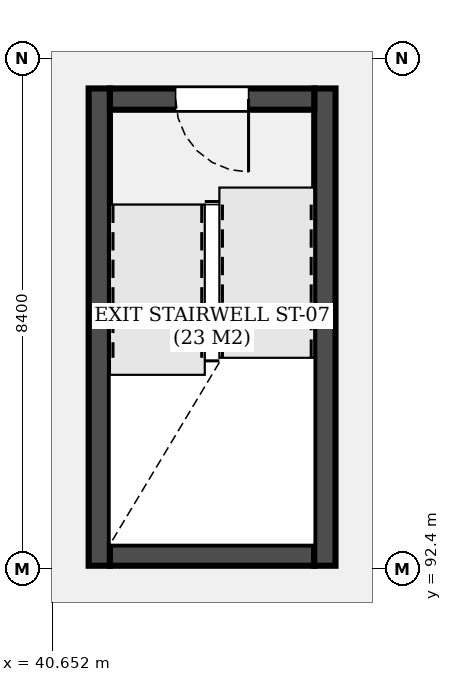
"""IFC4 building model, lengths in metres.
Left out: names, types, materials, properties, quantities, classifications, styles, units other than length and angle.
Written with IfcOpenShell. Run it as: python <this file> out.ifc"""

import sys

from ifc_helpers import new_model, si_unit, direction, frame, frame_2d, origin, place, context, subcontext, project, spatial, rectangle, extrude, element, fill, save


model = new_model("IFC4")
c1 = context("Model", 3, precision=1e-05, world=origin(), true_north=direction((0.0, 1.0)))
c2 = subcontext(c1, "Body", "Model", "MODEL_VIEW")
j1 = project(units=[si_unit("LENGTHUNIT", "METRE"), si_unit("PLANEANGLEUNIT", "RADIAN")], contexts=[c1])
p1 = place(None, origin())
s1 = spatial("IfcSite", under=j1, at=p1, CompositionType="ELEMENT")
p2 = place(p1, origin())
s2 = spatial("IfcBuilding", under=s1, at=p2, CompositionType="ELEMENT")
p3 = place(p2, frame((0.0, 0.0, 9.9)))
s3 = spatial("IfcBuildingStorey", under=s2, at=p3, CompositionType="ELEMENT", Elevation=9.9)
p4 = place(p3, frame((41.425, 100.3, 0.0), z_axis=(0.0, 0.0, 1.0), x_axis=(0.0, -1.0, 0.0)))
e1 = element("IfcWall", 1, at=p4, inside=s3, PredefinedType="SHEAR", context=c2, shape_type="SweptSolid", body=[
    extrude(rectangle(XDim=7.85, YDim=0.35, at=frame_2d((3.925, 0.0))), origin(), (0.0, 0.0, 1.0), 3.6),
])
p5 = place(p3, frame((41.6, 92.625, 0.0), z_axis=(0.0, 0.0, 1.0), x_axis=(1.0, 0.0, 0.0)))
e2 = element("IfcWall", 2, at=p5, inside=s3, PredefinedType="SHEAR", context=c2, shape_type="SweptSolid", body=[
    extrude(rectangle(XDim=3.36, YDim=0.35, at=frame_2d((1.68, 0.0))), origin(), (0.0, 0.0, 1.0), 3.6),
])
p6 = place(p3, frame((45.135, 92.45, 0.0), z_axis=(0.0, 0.0, 1.0), x_axis=(0.0, 1.0, 0.0)))
e3 = element("IfcWall", 3, at=p6, inside=s3, PredefinedType="SHEAR", context=c2, shape_type="SweptSolid", body=[
    extrude(rectangle(XDim=7.85, YDim=0.35, at=frame_2d((3.925, 0.0))), origin(), (0.0, 0.0, 1.0), 3.6),
])
p7 = place(p3, frame((44.96, 100.125, 0.0), z_axis=(0.0, 0.0, 1.0), x_axis=(-1.0, 0.0, 0.0)))
e4 = element("IfcWall", 4, at=p7, inside=s3, PredefinedType="SHEAR", context=c2, shape_type="SweptSolid", body=[
    extrude(rectangle(XDim=3.36, YDim=0.35, at=frame_2d((1.68, 0.0))), origin(), (0.0, 0.0, 1.0), 3.6),
])
p8 = place(p7, frame((1.08, 0.0, 0.0)))
e5 = element("IfcOpeningElement", 5, at=p8, cuts=e4, PredefinedType="OPENING", context=c2, shape_type="SweptSolid", body=[
    extrude(rectangle(XDim=1.2, YDim=2.2, at=frame_2d((0.6, 1.1))), frame((0.0, 0.185, 0.0), z_axis=(0.0, -1.0, 0.0), x_axis=(1.0, 0.0, 0.0)), (0.0, 0.0, 1.0), 0.37),
])
p9 = place(p8, origin())
e6 = element("IfcDoor", 6, at=p9, inside=s3, OperationType="SINGLE_SWING_LEFT", PredefinedType="DOOR", context=c2, shape_type="SweptSolid", body=[
    extrude(rectangle(XDim=1.2, YDim=2.2, at=frame_2d((0.6, 1.1))), frame((0.0, 0.025, 0.0), z_axis=(0.0, -1.0, 0.0), x_axis=(1.0, 0.0, 0.0)), (0.0, 0.0, 1.0), 0.05),
])
fill(e5, e6)
save(model, sys.argv[1])
